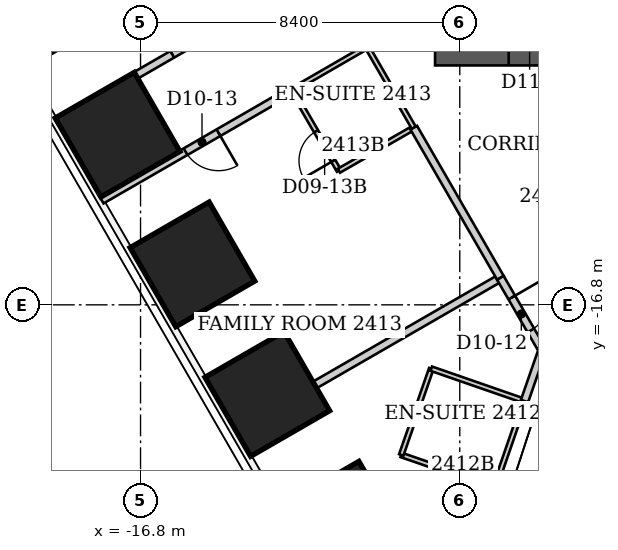
"""IFC4 building model, lengths in metres.
Left out: names, types, materials, properties, quantities, classifications, styles, units other than length and angle.
Written with IfcOpenShell. Run it as: python <this file> out.ifc"""

import sys

from ifc_helpers import new_model, si_unit, direction, frame, frame_2d, origin, origin_2d, place, context, subcontext, project, spatial, rectangle, extrude, element, fill, save


model = new_model("IFC4")
c1 = context("Model", 3, precision=1e-05, world=origin(), true_north=direction((0.0, 1.0)))
c2 = subcontext(c1, "Body", "Model", "MODEL_VIEW")
j1 = project(units=[si_unit("LENGTHUNIT", "METRE"), si_unit("PLANEANGLEUNIT", "RADIAN")], contexts=[c1])
p1 = place(None, origin())
s1 = spatial("IfcSite", under=j1, at=p1, CompositionType="ELEMENT")
p2 = place(p1, origin())
s2 = spatial("IfcBuilding", under=s1, at=p2, CompositionType="ELEMENT")
p3 = place(p2, frame((0.0, 0.0, 100.6)))
s3 = spatial("IfcBuildingStorey", under=s2, at=p3, CompositionType="ELEMENT", Elevation=100.6)
for number, where, z_axis, x_axis in (
    (1, (-11.494, -22.559, 0.0), (0.0, 0.0, 1.0), (-0.866, -0.5, 0.0)),
    (2, (-13.464, -19.147, 0.0), (0.0, 0.0, 1.0), (-0.866, -0.5, 0.0)),
    (3, (-15.434, -15.735, 0.0), (0.0, 0.0, 1.0), (-0.866, -0.5, 0.0)),
    (4, (-17.404, -12.323, 0.0), (0.0, 0.0, 1.0), (-0.866, -0.5, 0.0)),
    (5, (-19.374, -8.911, 0.0), (0.0, 0.0, 1.0), (-0.866, -0.5, 0.0)),
):
    element("IfcColumn", number, at=place(p3, frame(where, z_axis=z_axis, x_axis=x_axis)), inside=s3, PredefinedType="COLUMN", context=c2, shape_type="SweptSolid", body=[
        extrude(rectangle(XDim=2.4, YDim=2.4, at=origin_2d()), origin(), (0.0, 0.0, 1.0), 3.8),
    ])
p4 = place(p3, frame((-9.05, -9.85, 0.0), z_axis=(0.0, 0.0, 1.0), x_axis=(1.0, 0.0, 0.0)))
e6 = element("IfcWall", 6, at=p4, inside=s3, PredefinedType="SHEAR", context=c2, shape_type="SweptSolid", body=[
    extrude(rectangle(XDim=18.1, YDim=1.3, at=frame_2d((9.05, 0.0))), origin(), (0.0, 0.0, 1.0), 3.8),
])
p5 = place(p4, frame((1.938, 0.0, 0.0)))
e7 = element("IfcOpeningElement", 7, at=p5, cuts=e6, PredefinedType="OPENING", context=c2, shape_type="SweptSolid", body=[
    extrude(rectangle(XDim=1.1, YDim=2.2, at=frame_2d((0.55, 1.1))), frame((0.0, 0.65, 0.0), z_axis=(0.0, -1.0, 0.0), x_axis=(1.0, 0.0, 0.0)), (0.0, 0.0, 1.0), 1.3),
])
p6 = place(p4, frame((9.812, 0.0, 0.0)))
e8 = element("IfcOpeningElement", 8, at=p6, cuts=e6, PredefinedType="OPENING", context=c2, shape_type="SweptSolid", body=[
    extrude(rectangle(XDim=1.1, YDim=2.1, at=frame_2d((0.55, 1.05))), frame((0.0, 0.65, 0.0), z_axis=(0.0, -1.0, 0.0), x_axis=(1.0, 0.0, 0.0)), (0.0, 0.0, 1.0), 1.3),
])
p7 = place(p4, frame((12.438, 0.0, 0.0)))
e9 = element("IfcOpeningElement", 9, at=p7, cuts=e6, PredefinedType="OPENING", context=c2, shape_type="SweptSolid", body=[
    extrude(rectangle(XDim=1.1, YDim=2.1, at=frame_2d((0.55, 1.05))), frame((0.0, 0.65, 0.0), z_axis=(0.0, -1.0, 0.0), x_axis=(1.0, 0.0, 0.0)), (0.0, 0.0, 1.0), 1.3),
])
p8 = place(p4, frame((15.062, 0.0, 0.0)))
e10 = element("IfcOpeningElement", 10, at=p8, cuts=e6, PredefinedType="OPENING", context=c2, shape_type="SweptSolid", body=[
    extrude(rectangle(XDim=1.1, YDim=2.1, at=frame_2d((0.55, 1.05))), frame((0.0, 0.65, 0.0), z_axis=(0.0, -1.0, 0.0), x_axis=(1.0, 0.0, 0.0)), (0.0, 0.0, 1.0), 1.3),
])
p9 = place(p3, frame((-19.024, -11.975, 0.0), z_axis=(0.0, 0.0, 1.0), x_axis=(0.865863907772, 0.500279615034, 0.0)))
e11 = element("IfcWall", 11, at=p9, inside=s3, PredefinedType="PARTITIONING", context=c2, shape_type="SweptSolid", body=[
    extrude(rectangle(XDim=8.066, YDim=0.2, at=frame_2d((4.033, 0.0))), origin(), (0.0, 0.0, 1.0), 3.64),
])
p10 = place(p9, frame((3.533, 0.0, 0.0)))
e12 = element("IfcOpeningElement", 12, at=p10, cuts=e11, PredefinedType="OPENING", context=c2, shape_type="SweptSolid", body=[
    extrude(rectangle(XDim=1.0, YDim=2.13, at=frame_2d((0.5, 1.065))), frame((0.0, 0.1, 0.0), z_axis=(0.0, -1.0, 0.0), x_axis=(1.0, 0.0, 0.0)), (0.0, 0.0, 1.0), 0.2),
])
p11 = place(p3, frame((-17.824, -14.045, 0.0), z_axis=(0.0, 0.0, 1.0), x_axis=(0.866007919525, 0.500030282404, 0.0)))
e13 = element("IfcWall", 13, at=p11, inside=s3, PredefinedType="PARTITIONING", context=c2, shape_type="SweptSolid", body=[
    extrude(rectangle(XDim=5.79, YDim=0.2, at=frame_2d((2.895, 0.0))), origin(), (0.0, 0.0, 1.0), 3.64),
])
p12 = place(p11, frame((2.55, 0.0, 0.0)))
e14 = element("IfcOpeningElement", 14, at=p12, cuts=e13, PredefinedType="OPENING", context=c2, shape_type="SweptSolid", body=[
    extrude(rectangle(XDim=1.0, YDim=2.13, at=frame_2d((0.5, 1.065))), frame((0.0, 0.1, 0.0), z_axis=(0.0, -1.0, 0.0), x_axis=(1.0, 0.0, 0.0)), (0.0, 0.0, 1.0), 0.2),
])
p13 = place(p3, frame((-14.246, -20.08, 0.0), z_axis=(0.0, 0.0, 1.0), x_axis=(0.866178955952, 0.49973394548, 0.0)))
e15 = element("IfcWall", 15, at=p13, inside=s3, PredefinedType="PARTITIONING", context=c2, shape_type="SweptSolid", body=[
    extrude(rectangle(XDim=7.969, YDim=0.2, at=frame_2d((3.985, 0.0))), origin(), (0.0, 0.0, 1.0), 3.64),
])
p14 = place(p3, frame((-12.81, -11.15, 0.0), z_axis=(0.0, 0.0, 1.0), x_axis=(0.501813488763, -0.864975850817, 0.0)))
e16 = element("IfcWall", 16, at=p14, inside=s3, PredefinedType="PARTITIONING", context=c2, shape_type="SweptSolid", body=[
    extrude(rectangle(XDim=2.451, YDim=0.12, at=frame_2d((1.226, 0.0))), origin(), (0.0, 0.0, 1.0), 3.64),
])
p15 = place(p14, frame((1.251, 0.0, 0.0)))
e17 = element("IfcOpeningElement", 17, at=p15, cuts=e16, PredefinedType="OPENING", context=c2, shape_type="SweptSolid", body=[
    extrude(rectangle(XDim=0.9, YDim=2.03, at=frame_2d((0.45, 1.015))), frame((0.0, 0.06, 0.0), z_axis=(0.0, -1.0, 0.0), x_axis=(1.0, 0.0, 0.0)), (0.0, 0.0, 1.0), 0.12),
])
p16 = place(p3, frame((-12.81, -11.15, 0.0), z_axis=(0.0, 0.0, 1.0), x_axis=(0.865543766642, 0.500833293649, 0.0)))
e18 = element("IfcWall", 18, at=p16, inside=s3, PredefinedType="PARTITIONING", context=c2, shape_type="SweptSolid", body=[
    extrude(rectangle(XDim=2.276, YDim=0.12, at=frame_2d((1.138, 0.0))), origin(), (0.0, 0.0, 1.0), 3.64),
])
p17 = place(p3, frame((-11.58, -13.27, 0.0), z_axis=(0.0, 0.0, 1.0), x_axis=(0.867428373024, 0.497562074192, 0.0)))
e19 = element("IfcWall", 19, at=p17, inside=s3, PredefinedType="PARTITIONING", context=c2, shape_type="SweptSolid", body=[
    extrude(rectangle(XDim=2.271, YDim=0.12, at=frame_2d((1.136, 0.0))), origin(), (0.0, 0.0, 1.0), 3.64),
])
p18 = place(p3, frame((-10.84, -10.01, 0.0), z_axis=(0.0, 0.0, 1.0), x_axis=(0.500089055364, -0.86597398154, 0.0)))
e20 = element("IfcWall", 20, at=p18, inside=s3, PredefinedType="PARTITIONING", context=c2, shape_type="SweptSolid", body=[
    extrude(rectangle(XDim=2.459, YDim=0.12, at=frame_2d((1.23, 0.0))), origin(), (0.0, 0.0, 1.0), 3.64),
])
p19 = place(p3, frame((-9.94, -20.75, 0.0), z_axis=(0.0, 0.0, 1.0), x_axis=(0.94515546045, -0.326620813149, 0.0)))
e21 = element("IfcWall", 21, at=p19, inside=s3, PredefinedType="PARTITIONING", context=c2, shape_type="SweptSolid", body=[
    extrude(rectangle(XDim=2.603, YDim=0.12, at=frame_2d((1.301, 0.0))), origin(), (0.0, 0.0, 1.0), 3.64),
])
p20 = place(p19, frame((1.403, 0.0, 0.0)))
e22 = element("IfcOpeningElement", 22, at=p20, cuts=e21, PredefinedType="OPENING", context=c2, shape_type="SweptSolid", body=[
    extrude(rectangle(XDim=0.9, YDim=2.03, at=frame_2d((0.45, 1.015))), frame((0.0, 0.06, 0.0), z_axis=(0.0, -1.0, 0.0), x_axis=(1.0, 0.0, 0.0)), (0.0, 0.0, 1.0), 0.12),
])
p21 = place(p3, frame((-9.61, -12.14, 0.0), z_axis=(0.0, 0.0, 1.0), x_axis=(0.499898533245, -0.866083977718, 0.0)))
e23 = element("IfcWall", 23, at=p21, inside=s3, PredefinedType="PARTITIONING", context=c2, shape_type="SweptSolid", body=[
    extrude(rectangle(XDim=4.561, YDim=0.2, at=frame_2d((2.281, 0.0))), origin(), (0.0, 0.0, 1.0), 3.64),
])
p22 = place(p3, frame((-9.15, -18.48, 0.0), z_axis=(0.0, 0.0, 1.0), x_axis=(-0.328693963496, -0.944436487203, 0.0)))
e24 = element("IfcWall", 24, at=p22, inside=s3, PredefinedType="PARTITIONING", context=c2, shape_type="SweptSolid", body=[
    extrude(rectangle(XDim=2.404, YDim=0.12, at=frame_2d((1.202, 0.0))), origin(), (0.0, 0.0, 1.0), 3.64),
])
p23 = place(p3, frame((-7.48, -21.6, 0.0), z_axis=(0.0, 0.0, 1.0), x_axis=(0.326492166492, 0.945199907543, 0.0)))
e25 = element("IfcWall", 25, at=p23, inside=s3, PredefinedType="PARTITIONING", context=c2, shape_type="SweptSolid", body=[
    extrude(rectangle(XDim=2.4, YDim=0.12, at=frame_2d((1.2, 0.0))), origin(), (0.0, 0.0, 1.0), 3.64),
])
p24 = place(p3, frame((-7.331, -16.091, 0.0), z_axis=(0.0, 0.0, 1.0), x_axis=(0.501518373175, -0.865146994081, 0.0)))
e26 = element("IfcWall", 26, at=p24, inside=s3, PredefinedType="PARTITIONING", context=c2, shape_type="SweptSolid", body=[
    extrude(rectangle(XDim=2.196, YDim=0.2, at=frame_2d((1.098, 0.0))), origin(), (0.0, 0.0, 1.0), 3.64),
])
p25 = place(p24, frame((0.598, 0.0, 0.0)))
e27 = element("IfcOpeningElement", 27, at=p25, cuts=e26, PredefinedType="OPENING", context=c2, shape_type="SweptSolid", body=[
    extrude(rectangle(XDim=1.0, YDim=2.13, at=frame_2d((0.5, 1.065))), frame((0.0, 0.1, 0.0), z_axis=(0.0, -1.0, 0.0), x_axis=(1.0, 0.0, 0.0)), (0.0, 0.0, 1.0), 0.2),
])
p26 = place(p3, frame((-6.7, -19.33, 0.0), z_axis=(0.0, 0.0, 1.0), x_axis=(-0.944753042377, 0.327782990589, 0.0)))
e28 = element("IfcWall", 28, at=p26, inside=s3, PredefinedType="PARTITIONING", context=c2, shape_type="SweptSolid", body=[
    extrude(rectangle(XDim=2.594, YDim=0.12, at=frame_2d((1.297, 0.0))), origin(), (0.0, 0.0, 1.0), 3.64),
])
p27 = place(p3, frame((-6.696, -19.331, 0.0), z_axis=(0.0, 0.0, 1.0), x_axis=(0.328298231075, 0.944574121746, 0.0)))
e29 = element("IfcWall", 29, at=p27, inside=s3, PredefinedType="PARTITIONING", context=c2, shape_type="SweptSolid", body=[
    extrude(rectangle(XDim=1.32, YDim=0.2, at=frame_2d((0.66, 0.0))), origin(), (0.0, 0.0, 1.0), 3.64),
])
p28 = place(p25, origin())
e30 = element("IfcDoor", 30, at=p28, inside=s3, OperationType="SINGLE_SWING_LEFT", PredefinedType="DOOR", context=c2, shape_type="SweptSolid", body=[
    extrude(rectangle(XDim=1.0, YDim=2.13, at=frame_2d((0.5, 1.065))), frame((0.0, 0.025, 0.0), z_axis=(0.0, -1.0, 0.0), x_axis=(1.0, 0.0, 0.0)), (0.0, 0.0, 1.0), 0.05),
])
fill(e27, e30)
p29 = place(p12, origin())
e31 = element("IfcDoor", 31, at=p29, inside=s3, OperationType="SINGLE_SWING_RIGHT", PredefinedType="DOOR", context=c2, shape_type="SweptSolid", body=[
    extrude(rectangle(XDim=1.0, YDim=2.13, at=frame_2d((0.5, 1.065))), frame((0.0, 0.025, 0.0), z_axis=(0.0, -1.0, 0.0), x_axis=(1.0, 0.0, 0.0)), (0.0, 0.0, 1.0), 0.05),
])
fill(e14, e31)
p30 = place(p15, origin())
e32 = element("IfcDoor", 32, at=p30, inside=s3, OperationType="SINGLE_SWING_RIGHT", PredefinedType="DOOR", context=c2, shape_type="SweptSolid", body=[
    extrude(rectangle(XDim=0.9, YDim=2.03, at=frame_2d((0.45, 1.015))), frame((0.0, 0.025, 0.0), z_axis=(0.0, -1.0, 0.0), x_axis=(1.0, 0.0, 0.0)), (0.0, 0.0, 1.0), 0.05),
])
fill(e17, e32)
p31 = place(p10, origin())
e33 = element("IfcDoor", 33, at=p31, inside=s3, OperationType="SINGLE_SWING_LEFT", PredefinedType="DOOR", context=c2, shape_type="SweptSolid", body=[
    extrude(rectangle(XDim=1.0, YDim=2.13, at=frame_2d((0.5, 1.065))), frame((0.0, 0.025, 0.0), z_axis=(0.0, -1.0, 0.0), x_axis=(1.0, 0.0, 0.0)), (0.0, 0.0, 1.0), 0.05),
])
fill(e12, e33)
save(model, sys.argv[1])
